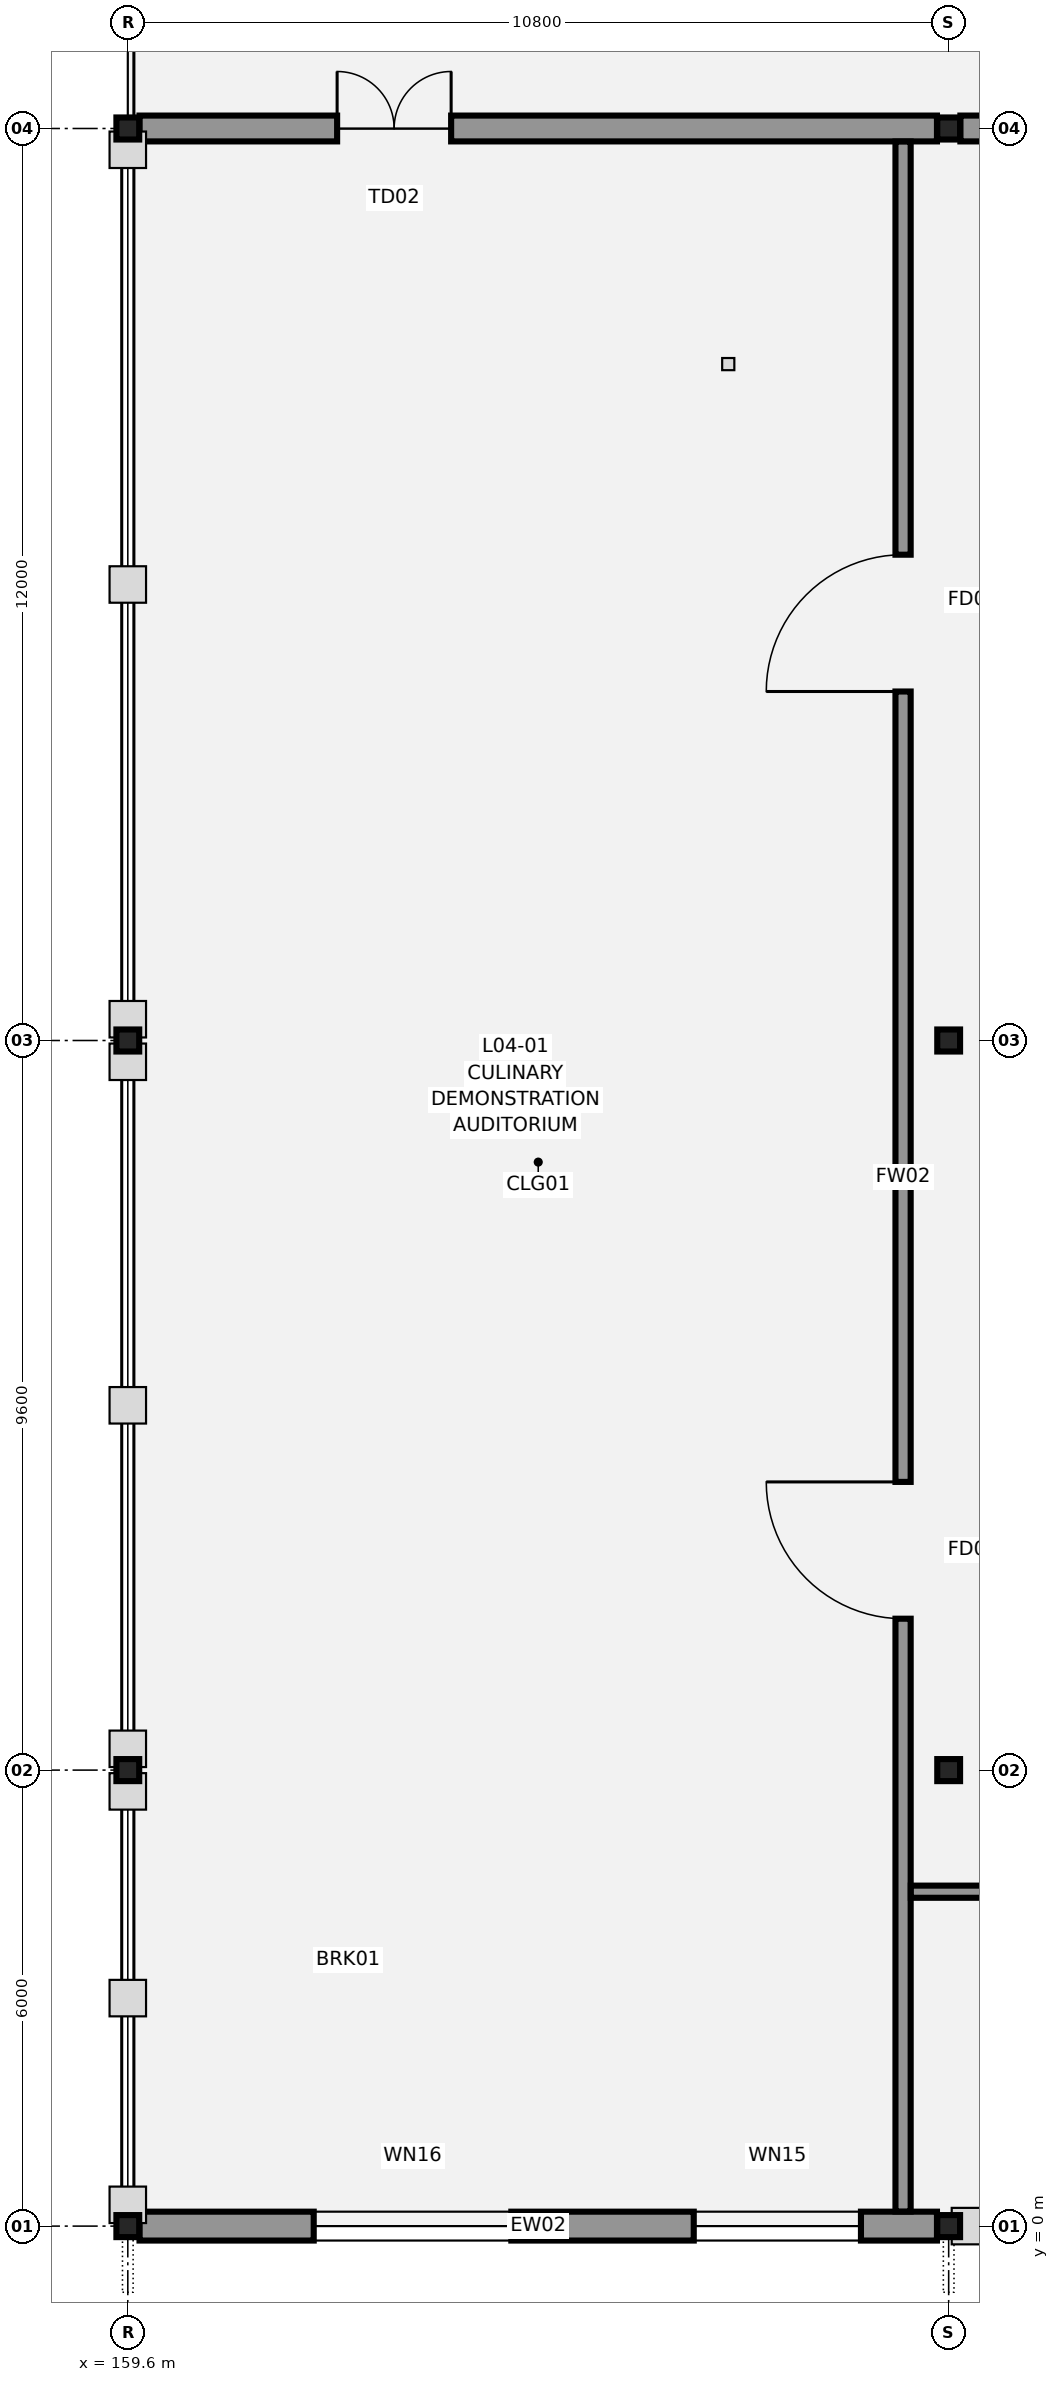
"""IFC4 building model, lengths in metres.
Left out: names, types, materials, properties, quantities, classifications, styles, units other than length and angle.
Written with IfcOpenShell. Run it as: python <this file> out.ifc"""

import sys

from ifc_helpers import new_model, si_unit, direction, frame, frame_2d, origin, origin_2d, place, context, subcontext, project, spatial, rectangle, i_section, extrude, element, fill, save


model = new_model("IFC4")
c1 = context("Model", 3, precision=1e-05, world=origin(), true_north=direction((0.0, 1.0)))
c2 = subcontext(c1, "Body", "Model", "MODEL_VIEW")
j1 = project(units=[si_unit("LENGTHUNIT", "METRE"), si_unit("PLANEANGLEUNIT", "RADIAN")], contexts=[c1])
p1 = place(None, origin())
s1 = spatial("IfcSite", under=j1, at=p1, CompositionType="ELEMENT")
p2 = place(p1, origin())
s2 = spatial("IfcBuilding", under=s1, at=p2, CompositionType="ELEMENT")
p3 = place(p2, frame((0.0, 0.0, 18.6)))
s3 = spatial("IfcBuildingStorey", under=s2, at=p3, CompositionType="ELEMENT", Elevation=18.6)
for number, where, z_axis, x_axis in (
    (1, (159.6, 0.0, 0.0), (0.0, 0.0, 1.0), (1.0, 0.0, 0.0)),
    (2, (159.6, 6.0, 0.0), (0.0, 0.0, 1.0), (1.0, 0.0, 0.0)),
    (3, (159.6, 15.6, 0.0), (0.0, 0.0, 1.0), (1.0, 0.0, 0.0)),
    (4, (159.6, 27.6, 0.0), (0.0, 0.0, 1.0), (1.0, 0.0, 0.0)),
    (5, (170.4, 0.0, 0.0), (0.0, 0.0, 1.0), (1.0, 0.0, 0.0)),
    (6, (170.4, 6.0, 0.0), (0.0, 0.0, 1.0), (1.0, 0.0, 0.0)),
    (7, (170.4, 15.6, 0.0), (0.0, 0.0, 1.0), (1.0, 0.0, 0.0)),
    (8, (170.4, 27.6, 0.0), (0.0, 0.0, 1.0), (1.0, 0.0, 0.0)),
):
    element("IfcColumn", number, at=place(p3, frame(where, z_axis=z_axis, x_axis=x_axis)), inside=s3, PredefinedType="COLUMN", context=c2, shape_type="SweptSolid", body=[
        extrude(i_section(OverallWidth=0.3, OverallDepth=0.29, WebThickness=0.009, FlangeThickness=0.014, FilletRadius=0.027, at=origin_2d()), origin(), (0.0, 0.0, 1.0), 2.9),
    ])
p4 = place(p3, frame((170.246, 0.0, 0.0), z_axis=(0.0, 0.0, 1.0), x_axis=(-1.0, 0.0, 0.0)))
e9 = element("IfcWall", 9, at=p4, inside=s3, PredefinedType="STANDARD", context=c2, shape_type="SweptSolid", body=[
    extrude(rectangle(XDim=10.492, YDim=0.38, at=frame_2d((5.246, 0.0))), origin(), (0.0, 0.0, 1.0), 2.45),
])
p5 = place(p4, frame((1.0, 0.0, 0.8)))
e10 = element("IfcOpeningElement", 10, at=p5, cuts=e9, PredefinedType="OPENING", context=c2, shape_type="SweptSolid", body=[
    extrude(rectangle(XDim=2.2, YDim=1.4, at=frame_2d((1.1, 0.7))), frame((0.0, 0.2, 0.0), z_axis=(0.0, -1.0, 0.0), x_axis=(1.0, 0.0, 0.0)), (0.0, 0.0, 1.0), 0.4),
])
p6 = place(p4, frame((5.6, 0.0, 0.8)))
e11 = element("IfcOpeningElement", 11, at=p6, cuts=e9, PredefinedType="OPENING", context=c2, shape_type="SweptSolid", body=[
    extrude(rectangle(XDim=2.6, YDim=1.4, at=frame_2d((1.3, 0.7))), frame((0.0, 0.2, 0.0), z_axis=(0.0, -1.0, 0.0), x_axis=(1.0, 0.0, 0.0)), (0.0, 0.0, 1.0), 0.4),
])
p7 = place(p3, frame((159.754, 27.6, 0.0), z_axis=(0.0, 0.0, 1.0), x_axis=(1.0, 0.0, 0.0)))
e12 = element("IfcWall", 12, at=p7, inside=s3, PredefinedType="STANDARD", context=c2, shape_type="SweptSolid", body=[
    extrude(rectangle(XDim=10.492, YDim=0.34, at=frame_2d((5.246, 0.0))), origin(), (0.0, 0.0, 1.0), 2.45),
])
p8 = place(p7, frame((2.6, 0.0, 0.0)))
e13 = element("IfcOpeningElement", 13, at=p8, cuts=e12, PredefinedType="OPENING", context=c2, shape_type="SweptSolid", body=[
    extrude(rectangle(XDim=1.5, YDim=2.3, at=frame_2d((0.75, 1.15))), frame((0.0, 0.18, 0.0), z_axis=(0.0, -1.0, 0.0), x_axis=(1.0, 0.0, 0.0)), (0.0, 0.0, 1.0), 0.36),
])
p9 = place(p3, frame((170.554, 27.6, 0.0), z_axis=(0.0, 0.0, 1.0), x_axis=(1.0, 0.0, 0.0)))
e14 = element("IfcWall", 14, at=p9, inside=s3, PredefinedType="STANDARD", context=c2, shape_type="SweptSolid", body=[
    extrude(rectangle(XDim=10.492, YDim=0.34, at=frame_2d((5.246, 0.0))), origin(), (0.0, 0.0, 1.0), 2.45),
])
p10 = place(p9, frame((2.0, 0.0, 0.8)))
e15 = element("IfcOpeningElement", 15, at=p10, cuts=e14, PredefinedType="OPENING", context=c2, shape_type="SweptSolid", body=[
    extrude(rectangle(XDim=1.8, YDim=1.4, at=frame_2d((0.9, 0.7))), frame((0.0, 0.18, 0.0), z_axis=(0.0, -1.0, 0.0), x_axis=(1.0, 0.0, 0.0)), (0.0, 0.0, 1.0), 0.36),
])
p11 = place(p3, frame((169.8, 0.192, 0.0), z_axis=(0.0, 0.0, 1.0), x_axis=(0.0, 1.0, 0.0)))
e16 = element("IfcWall", 16, at=p11, inside=s3, PredefinedType="PARTITIONING", context=c2, shape_type="SweptSolid", body=[
    extrude(rectangle(XDim=27.236, YDim=0.2, at=frame_2d((13.618, 0.0))), origin(), (0.0, 0.0, 1.0), 2.45),
])
p12 = place(p11, frame((7.8, 0.0, 0.0)))
e17 = element("IfcOpeningElement", 17, at=p12, cuts=e16, PredefinedType="OPENING", context=c2, shape_type="SweptSolid", body=[
    extrude(rectangle(XDim=1.8, YDim=2.2, at=frame_2d((0.9, 1.1))), frame((0.0, 0.11, 0.0), z_axis=(0.0, -1.0, 0.0), x_axis=(1.0, 0.0, 0.0)), (0.0, 0.0, 1.0), 0.22),
])
p13 = place(p11, frame((20.0, 0.0, 0.0)))
e18 = element("IfcOpeningElement", 18, at=p13, cuts=e16, PredefinedType="OPENING", context=c2, shape_type="SweptSolid", body=[
    extrude(rectangle(XDim=1.8, YDim=2.2, at=frame_2d((0.9, 1.1))), frame((0.0, 0.11, 0.0), z_axis=(0.0, -1.0, 0.0), x_axis=(1.0, 0.0, 0.0)), (0.0, 0.0, 1.0), 0.22),
])
p14 = place(p3, frame((169.902, 4.4, 0.0), z_axis=(0.0, 0.0, 1.0), x_axis=(1.0, 0.0, 0.0)))
e19 = element("IfcWall", 19, at=p14, inside=s3, PredefinedType="PARTITIONING", context=c2, shape_type="SweptSolid", body=[
    extrude(rectangle(XDim=17.616, YDim=0.16, at=frame_2d((8.808, 0.0))), origin(), (0.0, 0.0, 1.0), 2.45),
])
p15 = place(p14, frame((5.5, 0.0, 0.0)))
e20 = element("IfcOpeningElement", 20, at=p15, cuts=e19, PredefinedType="OPENING", context=c2, shape_type="SweptSolid", body=[
    extrude(rectangle(XDim=1.05, YDim=2.15, at=frame_2d((0.525, 1.075))), frame((0.0, 0.09, 0.0), z_axis=(0.0, -1.0, 0.0), x_axis=(1.0, 0.0, 0.0)), (0.0, 0.0, 1.0), 0.18),
])
p16 = place(p5, origin())
e21 = element("IfcWindow", 21, at=p16, inside=s3, PartitioningType="SINGLE_PANEL", PredefinedType="WINDOW", context=c2, shape_type="SweptSolid", body=[
    extrude(rectangle(XDim=2.2, YDim=1.4, at=frame_2d((1.1, 0.7))), frame((0.0, 0.03, 0.0), z_axis=(0.0, -1.0, 0.0), x_axis=(1.0, 0.0, 0.0)), (0.0, 0.0, 1.0), 0.06),
])
fill(e10, e21)
p17 = place(p6, origin())
e22 = element("IfcWindow", 22, at=p17, inside=s3, PartitioningType="SINGLE_PANEL", PredefinedType="WINDOW", context=c2, shape_type="SweptSolid", body=[
    extrude(rectangle(XDim=2.6, YDim=1.4, at=frame_2d((1.3, 0.7))), frame((0.0, 0.03, 0.0), z_axis=(0.0, -1.0, 0.0), x_axis=(1.0, 0.0, 0.0)), (0.0, 0.0, 1.0), 0.06),
])
fill(e11, e22)
p18 = place(p8, origin())
e23 = element("IfcDoor", 23, at=p18, inside=s3, OperationType="DOUBLE_DOOR_SINGLE_SWING", PredefinedType="DOOR", context=c2, shape_type="SweptSolid", body=[
    extrude(rectangle(XDim=1.5, YDim=2.3, at=frame_2d((0.75, 1.15))), frame((0.0, 0.025, 0.0), z_axis=(0.0, -1.0, 0.0), x_axis=(1.0, 0.0, 0.0)), (0.0, 0.0, 1.0), 0.05),
])
fill(e13, e23)
p19 = place(p12, origin())
e24 = element("IfcDoor", 24, at=p19, inside=s3, OperationType="SINGLE_SWING_RIGHT", PredefinedType="DOOR", context=c2, shape_type="SweptSolid", body=[
    extrude(rectangle(XDim=1.8, YDim=2.2, at=frame_2d((0.9, 1.1))), frame((0.0, 0.025, 0.0), z_axis=(0.0, -1.0, 0.0), x_axis=(1.0, 0.0, 0.0)), (0.0, 0.0, 1.0), 0.05),
])
fill(e17, e24)
p20 = place(p13, origin())
e25 = element("IfcDoor", 25, at=p20, inside=s3, OperationType="SINGLE_SWING_LEFT", PredefinedType="DOOR", context=c2, shape_type="SweptSolid", body=[
    extrude(rectangle(XDim=1.8, YDim=2.2, at=frame_2d((0.9, 1.1))), frame((0.0, 0.025, 0.0), z_axis=(0.0, -1.0, 0.0), x_axis=(1.0, 0.0, 0.0)), (0.0, 0.0, 1.0), 0.05),
])
fill(e18, e25)
save(model, sys.argv[1])
